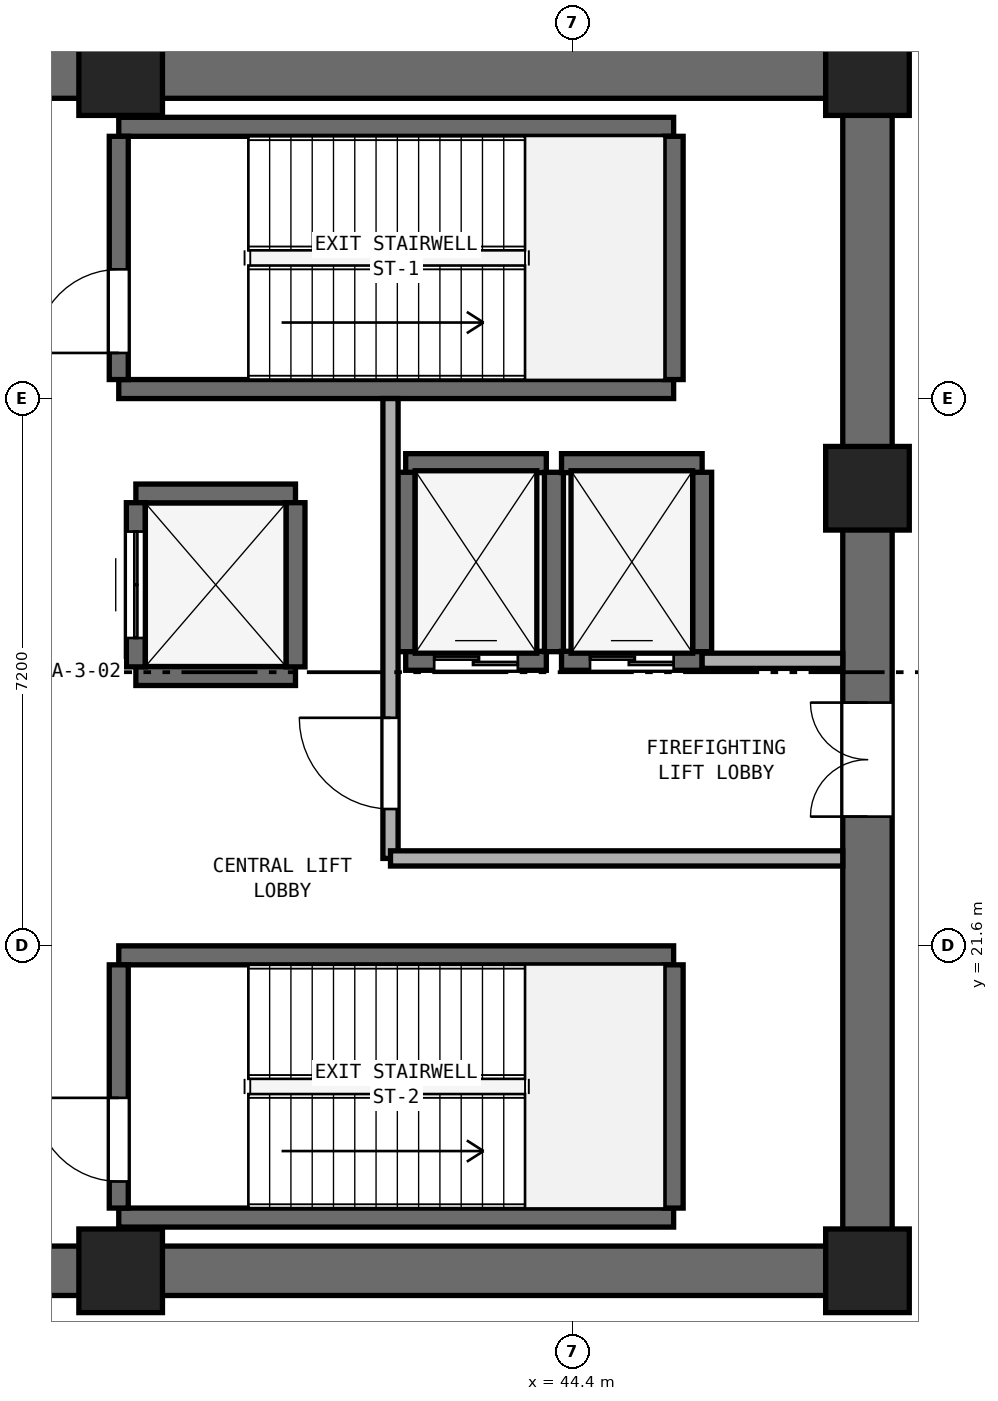
"""IFC4 building model, lengths in metres.
Left out: names, types, materials, properties, quantities, classifications, styles, units other than length and angle.
Written with IfcOpenShell. Run it as: python <this file> out.ifc"""

import sys

from ifc_helpers import new_model, si_unit, direction, frame, frame_2d, origin, origin_2d, place, context, subcontext, project, spatial, rectangle, extrude, element, fill, save


model = new_model("IFC4")
c1 = context("Model", 3, precision=1e-05, world=origin(), true_north=direction((0.0, 1.0)))
c2 = subcontext(c1, "Body", "Model", "MODEL_VIEW")
j1 = project(units=[si_unit("LENGTHUNIT", "METRE"), si_unit("PLANEANGLEUNIT", "RADIAN")], contexts=[c1])
p1 = place(None, origin())
s1 = spatial("IfcSite", under=j1, at=p1, CompositionType="ELEMENT")
p2 = place(p1, origin())
s2 = spatial("IfcBuilding", under=s1, at=p2, CompositionType="ELEMENT")
p3 = place(p2, frame((0.0, 0.0, 15.0)))
s3 = spatial("IfcBuildingStorey", under=s2, at=p3, CompositionType="ELEMENT", Elevation=15.0)
for number, where, z_axis, x_axis in (
    (1, (25.4, 17.325, 0.0), (0.0, 0.0, 1.0), (1.0, 0.0, 0.0)),
    (2, (25.4, 33.075, 0.0), (0.0, 0.0, 1.0), (1.0, 0.0, 0.0)),
):
    element("IfcWall", number, at=place(p3, frame(where, z_axis=z_axis, x_axis=x_axis)), inside=s3, PredefinedType="SHEAR", context=c2, shape_type="SweptSolid", body=[
        extrude(rectangle(XDim=23.2, YDim=0.65, at=frame_2d((11.6, 0.0))), origin(), (0.0, 0.0, 1.0), 4.68),
    ])
p4 = place(p3, frame((48.275, 17.65, 0.0), z_axis=(0.0, 0.0, 1.0), x_axis=(0.0, 1.0, 0.0)))
e3 = element("IfcWall", 3, at=p4, inside=s3, PredefinedType="SHEAR", context=c2, shape_type="SweptSolid", body=[
    extrude(rectangle(XDim=15.1, YDim=0.65, at=frame_2d((7.55, 0.0))), origin(), (0.0, 0.0, 1.0), 4.68),
])
p5 = place(p4, frame((5.65, 0.0, 0.0)))
e4 = element("IfcOpeningElement", 4, at=p5, cuts=e3, PredefinedType="OPENING", context=c2, shape_type="SweptSolid", body=[
    extrude(rectangle(XDim=1.5, YDim=2.15, at=frame_2d((0.75, 1.075))), frame((0.0, 0.335, 0.0), z_axis=(0.0, -1.0, 0.0), x_axis=(1.0, 0.0, 0.0)), (0.0, 0.0, 1.0), 0.67),
])
for number, where, z_axis, x_axis in (
    (5, (38.45, 17.325, 0.0), (0.0, 0.0, 1.0), (1.0, 0.0, 0.0)),
    (6, (48.275, 17.325, 0.0), (0.0, 0.0, 1.0), (1.0, 0.0, 0.0)),
    (7, (48.275, 27.62, 0.0), (0.0, 0.0, 1.0), (1.0, 0.0, 0.0)),
    (8, (48.275, 33.075, 0.0), (0.0, 0.0, 1.0), (1.0, 0.0, 0.0)),
    (9, (38.45, 33.075, 0.0), (0.0, 0.0, 1.0), (1.0, 0.0, 0.0)),
):
    element("IfcColumn", number, at=place(p3, frame(where, z_axis=z_axis, x_axis=x_axis)), inside=s3, PredefinedType="PILASTER", context=c2, shape_type="SweptSolid", body=[
        extrude(rectangle(XDim=1.1, YDim=1.1, at=origin_2d()), origin(), (0.0, 0.0, 1.0), 5.0),
    ])
for number, where, z_axis, x_axis in (
    (10, (38.425, 28.925, 0.0), (0.0, 0.0, 1.0), (1.0, 0.0, 0.0)),
    (11, (38.425, 32.375, 0.0), (0.0, 0.0, 1.0), (1.0, 0.0, 0.0)),
):
    element("IfcWall", number, at=place(p3, frame(where, z_axis=z_axis, x_axis=x_axis)), inside=s3, PredefinedType="SHEAR", context=c2, shape_type="SweptSolid", body=[
        extrude(rectangle(XDim=7.3, YDim=0.25, at=frame_2d((3.65, 0.0))), origin(), (0.0, 0.0, 1.0), 4.68),
    ])
p6 = place(p3, frame((38.425, 29.05, 0.0), z_axis=(0.0, 0.0, 1.0), x_axis=(0.0, 1.0, 0.0)))
e12 = element("IfcWall", 12, at=p6, inside=s3, PredefinedType="SHEAR", context=c2, shape_type="SweptSolid", body=[
    extrude(rectangle(XDim=3.2, YDim=0.25, at=frame_2d((1.6, 0.0))), origin(), (0.0, 0.0, 1.0), 4.68),
])
p7 = place(p6, frame((0.35, 0.0, 0.0)))
e13 = element("IfcOpeningElement", 13, at=p7, cuts=e12, PredefinedType="OPENING", context=c2, shape_type="SweptSolid", body=[
    extrude(rectangle(XDim=1.1, YDim=2.15, at=frame_2d((0.55, 1.075))), frame((0.0, 0.135, 0.0), z_axis=(0.0, -1.0, 0.0), x_axis=(1.0, 0.0, 0.0)), (0.0, 0.0, 1.0), 0.27),
])
p8 = place(p3, frame((45.725, 29.05, 0.0), z_axis=(0.0, 0.0, 1.0), x_axis=(0.0, 1.0, 0.0)))
e14 = element("IfcWall", 14, at=p8, inside=s3, PredefinedType="SHEAR", context=c2, shape_type="SweptSolid", body=[
    extrude(rectangle(XDim=3.2, YDim=0.25, at=frame_2d((1.6, 0.0))), origin(), (0.0, 0.0, 1.0), 4.68),
])
for number, where, z_axis, x_axis in (
    (15, (38.425, 18.025, 0.0), (0.0, 0.0, 1.0), (1.0, 0.0, 0.0)),
    (16, (38.425, 21.475, 0.0), (0.0, 0.0, 1.0), (1.0, 0.0, 0.0)),
):
    element("IfcWall", number, at=place(p3, frame(where, z_axis=z_axis, x_axis=x_axis)), inside=s3, PredefinedType="SHEAR", context=c2, shape_type="SweptSolid", body=[
        extrude(rectangle(XDim=7.3, YDim=0.25, at=frame_2d((3.65, 0.0))), origin(), (0.0, 0.0, 1.0), 4.68),
    ])
p9 = place(p3, frame((38.425, 18.15, 0.0), z_axis=(0.0, 0.0, 1.0), x_axis=(0.0, 1.0, 0.0)))
e17 = element("IfcWall", 17, at=p9, inside=s3, PredefinedType="SHEAR", context=c2, shape_type="SweptSolid", body=[
    extrude(rectangle(XDim=3.2, YDim=0.25, at=frame_2d((1.6, 0.0))), origin(), (0.0, 0.0, 1.0), 4.68),
])
p10 = place(p9, frame((0.35, 0.0, 0.0)))
e18 = element("IfcOpeningElement", 18, at=p10, cuts=e17, PredefinedType="OPENING", context=c2, shape_type="SweptSolid", body=[
    extrude(rectangle(XDim=1.1, YDim=2.15, at=frame_2d((0.55, 1.075))), frame((0.0, 0.135, 0.0), z_axis=(0.0, -1.0, 0.0), x_axis=(1.0, 0.0, 0.0)), (0.0, 0.0, 1.0), 0.27),
])
p11 = place(p3, frame((45.725, 18.15, 0.0), z_axis=(0.0, 0.0, 1.0), x_axis=(0.0, 1.0, 0.0)))
e19 = element("IfcWall", 19, at=p11, inside=s3, PredefinedType="SHEAR", context=c2, shape_type="SweptSolid", body=[
    extrude(rectangle(XDim=3.2, YDim=0.25, at=frame_2d((1.6, 0.0))), origin(), (0.0, 0.0, 1.0), 4.68),
])
p12 = place(p3, frame((42.2, 25.35, 0.0), z_axis=(0.0, 0.0, 1.0), x_axis=(1.0, 0.0, 0.0)))
e20 = element("IfcWall", 20, at=p12, inside=s3, PredefinedType="SHEAR", context=c2, shape_type="SweptSolid", body=[
    extrude(rectangle(XDim=1.85, YDim=0.25, at=frame_2d((0.925, 0.0))), origin(), (0.0, 0.0, 1.0), 4.68),
])
p13 = place(p12, frame((0.375, 0.0, 0.0)))
e21 = element("IfcOpeningElement", 21, at=p13, cuts=e20, PredefinedType="OPENING", context=c2, shape_type="SweptSolid", body=[
    extrude(rectangle(XDim=1.1, YDim=2.15, at=frame_2d((0.55, 1.075))), frame((0.0, 0.135, 0.0), z_axis=(0.0, -1.0, 0.0), x_axis=(1.0, 0.0, 0.0)), (0.0, 0.0, 1.0), 0.27),
])
p14 = place(p3, frame((42.2, 27.95, 0.0), z_axis=(0.0, 0.0, 1.0), x_axis=(1.0, 0.0, 0.0)))
e22 = element("IfcWall", 22, at=p14, inside=s3, PredefinedType="SHEAR", context=c2, shape_type="SweptSolid", body=[
    extrude(rectangle(XDim=1.85, YDim=0.25, at=frame_2d((0.925, 0.0))), origin(), (0.0, 0.0, 1.0), 4.68),
])
for number, where, z_axis, x_axis in (
    (23, (42.2, 25.47, 0.0), (0.0, 0.0, 1.0), (0.0, 1.0, 0.0)),
    (24, (44.15, 25.47, 0.0), (0.0, 0.0, 1.0), (0.0, 1.0, 0.0)),
):
    element("IfcWall", number, at=place(p3, frame(where, z_axis=z_axis, x_axis=x_axis)), inside=s3, PredefinedType="SHEAR", context=c2, shape_type="SweptSolid", body=[
        extrude(rectangle(XDim=2.36, YDim=0.25, at=frame_2d((1.18, 0.0))), origin(), (0.0, 0.0, 1.0), 4.68),
    ])
p15 = place(p3, frame((44.25, 25.35, 0.0), z_axis=(0.0, 0.0, 1.0), x_axis=(1.0, 0.0, 0.0)))
e25 = element("IfcWall", 25, at=p15, inside=s3, PredefinedType="SHEAR", context=c2, shape_type="SweptSolid", body=[
    extrude(rectangle(XDim=1.85, YDim=0.25, at=frame_2d((0.925, 0.0))), origin(), (0.0, 0.0, 1.0), 4.68),
])
p16 = place(p15, frame((0.375, 0.0, 0.0)))
e26 = element("IfcOpeningElement", 26, at=p16, cuts=e25, PredefinedType="OPENING", context=c2, shape_type="SweptSolid", body=[
    extrude(rectangle(XDim=1.1, YDim=2.15, at=frame_2d((0.55, 1.075))), frame((0.0, 0.135, 0.0), z_axis=(0.0, -1.0, 0.0), x_axis=(1.0, 0.0, 0.0)), (0.0, 0.0, 1.0), 0.27),
])
p17 = place(p3, frame((44.25, 27.95, 0.0), z_axis=(0.0, 0.0, 1.0), x_axis=(1.0, 0.0, 0.0)))
e27 = element("IfcWall", 27, at=p17, inside=s3, PredefinedType="SHEAR", context=c2, shape_type="SweptSolid", body=[
    extrude(rectangle(XDim=1.85, YDim=0.25, at=frame_2d((0.925, 0.0))), origin(), (0.0, 0.0, 1.0), 4.68),
])
p18 = place(p3, frame((46.1, 25.47, 0.0), z_axis=(0.0, 0.0, 1.0), x_axis=(0.0, 1.0, 0.0)))
e28 = element("IfcWall", 28, at=p18, inside=s3, PredefinedType="SHEAR", context=c2, shape_type="SweptSolid", body=[
    extrude(rectangle(XDim=2.36, YDim=0.25, at=frame_2d((1.18, 0.0))), origin(), (0.0, 0.0, 1.0), 4.68),
])
for number, where, z_axis, x_axis in (
    (29, (38.65, 25.15, 0.0), (0.0, 0.0, 1.0), (1.0, 0.0, 0.0)),
    (30, (38.65, 27.55, 0.0), (0.0, 0.0, 1.0), (1.0, 0.0, 0.0)),
):
    element("IfcWall", number, at=place(p3, frame(where, z_axis=z_axis, x_axis=x_axis)), inside=s3, PredefinedType="SHEAR", context=c2, shape_type="SweptSolid", body=[
        extrude(rectangle(XDim=2.1, YDim=0.25, at=frame_2d((1.05, 0.0))), origin(), (0.0, 0.0, 1.0), 4.68),
    ])
p19 = place(p3, frame((38.65, 25.27, 0.0), z_axis=(0.0, 0.0, 1.0), x_axis=(0.0, 1.0, 0.0)))
e31 = element("IfcWall", 31, at=p19, inside=s3, PredefinedType="SHEAR", context=c2, shape_type="SweptSolid", body=[
    extrude(rectangle(XDim=2.16, YDim=0.25, at=frame_2d((1.08, 0.0))), origin(), (0.0, 0.0, 1.0), 4.68),
])
p20 = place(p19, frame((0.38, 0.0, 0.0)))
e32 = element("IfcOpeningElement", 32, at=p20, cuts=e31, PredefinedType="OPENING", context=c2, shape_type="SweptSolid", body=[
    extrude(rectangle(XDim=1.4, YDim=2.2, at=frame_2d((0.7, 1.1))), frame((0.0, 0.135, 0.0), z_axis=(0.0, -1.0, 0.0), x_axis=(1.0, 0.0, 0.0)), (0.0, 0.0, 1.0), 0.27),
])
p21 = place(p3, frame((40.75, 25.27, 0.0), z_axis=(0.0, 0.0, 1.0), x_axis=(0.0, 1.0, 0.0)))
e33 = element("IfcWall", 33, at=p21, inside=s3, PredefinedType="SHEAR", context=c2, shape_type="SweptSolid", body=[
    extrude(rectangle(XDim=2.16, YDim=0.25, at=frame_2d((1.08, 0.0))), origin(), (0.0, 0.0, 1.0), 4.68),
])
p22 = place(p3, frame((42.0, 22.75, 0.0), z_axis=(0.0, 0.0, 1.0), x_axis=(0.0, 1.0, 0.0)))
e34 = element("IfcWall", 34, at=p22, inside=s3, PredefinedType="SOLIDWALL", context=c2, shape_type="SweptSolid", body=[
    extrude(rectangle(XDim=6.05, YDim=0.2, at=frame_2d((3.025, 0.0))), origin(), (0.0, 0.0, 1.0), 4.68),
])
p23 = place(p22, frame((0.65, 0.0, 0.0)))
e35 = element("IfcOpeningElement", 35, at=p23, cuts=e34, PredefinedType="OPENING", context=c2, shape_type="SweptSolid", body=[
    extrude(rectangle(XDim=1.2, YDim=2.15, at=frame_2d((0.6, 1.075))), frame((0.0, 0.11, 0.0), z_axis=(0.0, -1.0, 0.0), x_axis=(1.0, 0.0, 0.0)), (0.0, 0.0, 1.0), 0.22),
])
p24 = place(p3, frame((42.0, 22.75, 0.0), z_axis=(0.0, 0.0, 1.0), x_axis=(1.0, 0.0, 0.0)))
e36 = element("IfcWall", 36, at=p24, inside=s3, PredefinedType="SOLIDWALL", context=c2, shape_type="SweptSolid", body=[
    extrude(rectangle(XDim=5.95, YDim=0.2, at=frame_2d((2.975, 0.0))), origin(), (0.0, 0.0, 1.0), 4.68),
])
p25 = place(p3, frame((46.1, 25.35, 0.0), z_axis=(0.0, 0.0, 1.0), x_axis=(1.0, 0.0, 0.0)))
e37 = element("IfcWall", 37, at=p25, inside=s3, PredefinedType="SOLIDWALL", context=c2, shape_type="SweptSolid", body=[
    extrude(rectangle(XDim=1.85, YDim=0.2, at=frame_2d((0.925, 0.0))), origin(), (0.0, 0.0, 1.0), 4.68),
])
p26 = place(p7, origin())
e38 = element("IfcDoor", 38, at=p26, inside=s3, OperationType="SINGLE_SWING_LEFT", PredefinedType="DOOR", context=c2, shape_type="SweptSolid", body=[
    extrude(rectangle(XDim=1.1, YDim=2.15, at=frame_2d((0.55, 1.075))), frame((0.0, 0.025, 0.0), z_axis=(0.0, -1.0, 0.0), x_axis=(1.0, 0.0, 0.0)), (0.0, 0.0, 1.0), 0.05),
])
fill(e13, e38)
p27 = place(p10, origin())
e39 = element("IfcDoor", 39, at=p27, inside=s3, OperationType="SINGLE_SWING_RIGHT", PredefinedType="DOOR", context=c2, shape_type="SweptSolid", body=[
    extrude(rectangle(XDim=1.1, YDim=2.15, at=frame_2d((0.55, 1.075))), frame((0.0, 0.025, 0.0), z_axis=(0.0, -1.0, 0.0), x_axis=(1.0, 0.0, 0.0)), (0.0, 0.0, 1.0), 0.05),
])
fill(e18, e39)
p28 = place(p13, origin())
e40 = element("IfcDoor", 40, at=p28, inside=s3, OperationType="DOUBLE_DOOR_SLIDING", PredefinedType="DOOR", context=c2, shape_type="SweptSolid", body=[
    extrude(rectangle(XDim=1.1, YDim=2.15, at=frame_2d((0.55, 1.075))), frame((0.0, 0.025, 0.0), z_axis=(0.0, -1.0, 0.0), x_axis=(1.0, 0.0, 0.0)), (0.0, 0.0, 1.0), 0.05),
])
fill(e21, e40)
p29 = place(p16, origin())
e41 = element("IfcDoor", 41, at=p29, inside=s3, OperationType="DOUBLE_DOOR_SLIDING", PredefinedType="DOOR", context=c2, shape_type="SweptSolid", body=[
    extrude(rectangle(XDim=1.1, YDim=2.15, at=frame_2d((0.55, 1.075))), frame((0.0, 0.025, 0.0), z_axis=(0.0, -1.0, 0.0), x_axis=(1.0, 0.0, 0.0)), (0.0, 0.0, 1.0), 0.05),
])
fill(e26, e41)
p30 = place(p20, origin())
e42 = element("IfcDoor", 42, at=p30, inside=s3, OperationType="DOUBLE_DOOR_SLIDING", PredefinedType="DOOR", context=c2, shape_type="SweptSolid", body=[
    extrude(rectangle(XDim=1.4, YDim=2.2, at=frame_2d((0.7, 1.1))), frame((0.0, 0.025, 0.0), z_axis=(0.0, -1.0, 0.0), x_axis=(1.0, 0.0, 0.0)), (0.0, 0.0, 1.0), 0.05),
])
fill(e32, e42)
p31 = place(p23, origin())
e43 = element("IfcDoor", 43, at=p31, inside=s3, OperationType="SINGLE_SWING_RIGHT", PredefinedType="DOOR", context=c2, shape_type="SweptSolid", body=[
    extrude(rectangle(XDim=1.2, YDim=2.15, at=frame_2d((0.6, 1.075))), frame((0.0, 0.025, 0.0), z_axis=(0.0, -1.0, 0.0), x_axis=(1.0, 0.0, 0.0)), (0.0, 0.0, 1.0), 0.05),
])
fill(e35, e43)
p32 = place(p5, origin())
e44 = element("IfcDoor", 44, at=p32, inside=s3, OperationType="DOUBLE_DOOR_SINGLE_SWING", PredefinedType="DOOR", context=c2, shape_type="SweptSolid", body=[
    extrude(rectangle(XDim=1.5, YDim=2.15, at=frame_2d((0.75, 1.075))), frame((0.0, 0.025, 0.0), z_axis=(0.0, -1.0, 0.0), x_axis=(1.0, 0.0, 0.0)), (0.0, 0.0, 1.0), 0.05),
])
fill(e4, e44)
save(model, sys.argv[1])
